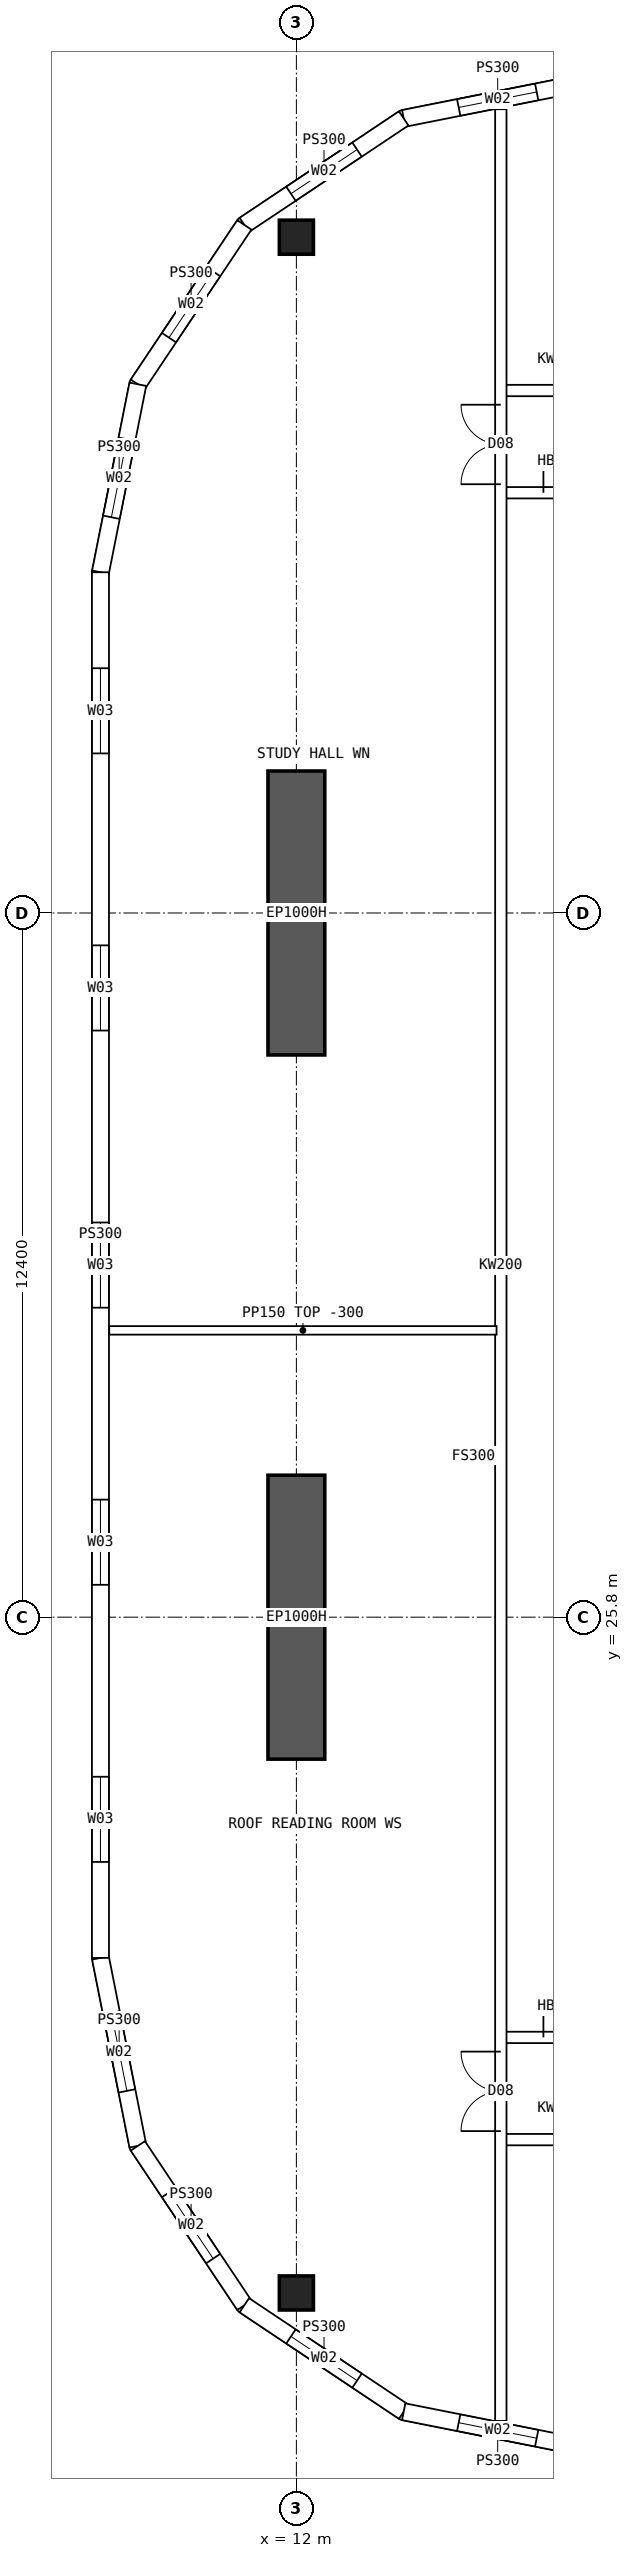
"""IFC4 building model, lengths in metres.
Left out: names, types, materials, properties, quantities, classifications, styles, units other than length and angle.
Written with IfcOpenShell. Run it as: python <this file> out.ifc"""

import sys

from ifc_helpers import new_model, si_unit, direction, frame, frame_2d, origin, origin_2d, place, context, subcontext, project, spatial, polyline, rectangle, hollow_rectangle, outline, extrude, element, fill, save


model = new_model("IFC4")
c1 = context("Model", 3, precision=1e-05, world=origin(), true_north=direction((0.0, 1.0)))
c2 = subcontext(c1, "Body", "Model", "MODEL_VIEW")
j1 = project(units=[si_unit("LENGTHUNIT", "METRE"), si_unit("PLANEANGLEUNIT", "RADIAN")], contexts=[c1])
p1 = place(None, origin())
s1 = spatial("IfcSite", under=j1, at=p1, CompositionType="ELEMENT")
p2 = place(p1, origin())
s2 = spatial("IfcBuilding", under=s1, at=p2, CompositionType="ELEMENT")
p3 = place(p2, frame((0.0, 0.0, 257.8)))
s3 = spatial("IfcBuildingStorey", under=s2, at=p3, CompositionType="ELEMENT", Elevation=257.8)
for number, where, z_axis, x_axis in (
    (1, (12.0, 13.9, 0.0), (0.0, 0.0, 1.0), (1.0, 0.0, 0.0)),
    (2, (12.0, 50.1, 0.0), (0.0, 0.0, 1.0), (1.0, 0.0, 0.0)),
):
    element("IfcColumn", number, at=place(p3, frame(where, z_axis=z_axis, x_axis=x_axis)), inside=s3, PredefinedType="COLUMN", context=c2, shape_type="SweptSolid", body=[
        extrude(hollow_rectangle(XDim=0.6, YDim=0.6, WallThickness=0.06, at=origin_2d()), origin(), (0.0, 0.0, 1.0), 4.5),
    ])
for number, where, z_axis, x_axis in (
    (3, (12.0, 23.3, 0.0), (0.0, 0.0, 1.0), (0.0, 1.0, 0.0)),
    (4, (12.0, 35.7, 0.0), (0.0, 0.0, 1.0), (0.0, 1.0, 0.0)),
):
    element("IfcWall", number, at=place(p3, frame(where, z_axis=z_axis, x_axis=x_axis)), inside=s3, PredefinedType="SHEAR", context=c2, shape_type="SweptSolid", body=[
        extrude(rectangle(XDim=5.0, YDim=1.0, at=frame_2d((2.5, 0.0))), origin(), (0.0, 0.0, 1.0), 4.5),
    ])
p4 = place(p3, frame((8.55, 44.2, 0.0), z_axis=(0.0, 0.0, 1.0), x_axis=(0.0, -1.0, 0.0)))
e5 = element("IfcWall", 5, at=p4, inside=s3, PredefinedType="SOLIDWALL", context=c2, shape_type="SweptSolid", body=[
    extrude(outline(polyline([(-0.015, -0.15), (24.415, -0.15), (24.385, 0.15), (0.015, 0.15), (-0.015, -0.15)])), origin(), (0.0, 0.0, 1.0), 4.2),
])
p5 = place(p4, frame((1.69, 0.0, 0.5)))
e6 = element("IfcOpeningElement", 6, at=p5, cuts=e5, PredefinedType="OPENING", context=c2, shape_type="SweptSolid", body=[
    extrude(rectangle(XDim=1.5, YDim=2.4, at=frame_2d((0.75, 1.2))), frame((0.0, 0.16, 0.0), z_axis=(0.0, -1.0, 0.0), x_axis=(1.0, 0.0, 0.0)), (0.0, 0.0, 1.0), 0.32),
])
p6 = place(p4, frame((6.57, 0.0, 0.5)))
e7 = element("IfcOpeningElement", 7, at=p6, cuts=e5, PredefinedType="OPENING", context=c2, shape_type="SweptSolid", body=[
    extrude(rectangle(XDim=1.5, YDim=2.4, at=frame_2d((0.75, 1.2))), frame((0.0, 0.16, 0.0), z_axis=(0.0, -1.0, 0.0), x_axis=(1.0, 0.0, 0.0)), (0.0, 0.0, 1.0), 0.32),
])
p7 = place(p4, frame((11.45, 0.0, 0.5)))
e8 = element("IfcOpeningElement", 8, at=p7, cuts=e5, PredefinedType="OPENING", context=c2, shape_type="SweptSolid", body=[
    extrude(rectangle(XDim=1.5, YDim=2.4, at=frame_2d((0.75, 1.2))), frame((0.0, 0.16, 0.0), z_axis=(0.0, -1.0, 0.0), x_axis=(1.0, 0.0, 0.0)), (0.0, 0.0, 1.0), 0.32),
])
p8 = place(p4, frame((16.33, 0.0, 0.5)))
e9 = element("IfcOpeningElement", 9, at=p8, cuts=e5, PredefinedType="OPENING", context=c2, shape_type="SweptSolid", body=[
    extrude(rectangle(XDim=1.5, YDim=2.4, at=frame_2d((0.75, 1.2))), frame((0.0, 0.16, 0.0), z_axis=(0.0, -1.0, 0.0), x_axis=(1.0, 0.0, 0.0)), (0.0, 0.0, 1.0), 0.32),
])
p9 = place(p4, frame((21.21, 0.0, 0.5)))
e10 = element("IfcOpeningElement", 10, at=p9, cuts=e5, PredefinedType="OPENING", context=c2, shape_type="SweptSolid", body=[
    extrude(rectangle(XDim=1.5, YDim=2.4, at=frame_2d((0.75, 1.2))), frame((0.0, 0.16, 0.0), z_axis=(0.0, -1.0, 0.0), x_axis=(1.0, 0.0, 0.0)), (0.0, 0.0, 1.0), 0.32),
])
p10 = place(p3, frame((17.2, 52.85, 0.0), z_axis=(0.0, 0.0, 1.0), x_axis=(-0.98078325777, -0.195100490205, 0.0)))
e11 = element("IfcWall", 11, at=p10, inside=s3, PredefinedType="SOLIDWALL", context=c2, shape_type="SweptSolid", body=[
    extrude(outline(polyline([(-0.03, -0.15), (3.405, -0.15), (3.345, 0.15), (0.03, 0.15), (-0.03, -0.15)])), origin(), (0.0, 0.0, 1.0), 4.2),
])
p11 = place(p10, frame((0.988, 0.0, 0.9)))
e12 = element("IfcOpeningElement", 12, at=p11, cuts=e11, PredefinedType="OPENING", context=c2, shape_type="SweptSolid", body=[
    extrude(rectangle(XDim=1.4, YDim=1.8, at=frame_2d((0.7, 0.9))), frame((0.0, 0.16, 0.0), z_axis=(0.0, -1.0, 0.0), x_axis=(1.0, 0.0, 0.0)), (0.0, 0.0, 1.0), 0.32),
])
p12 = place(p3, frame((13.89, 52.192, 0.0), z_axis=(0.0, 0.0, 1.0), x_axis=(-0.831460037396, -0.555584562613, 0.0)))
e13 = element("IfcWall", 13, at=p12, inside=s3, PredefinedType="SOLIDWALL", context=c2, shape_type="SweptSolid", body=[
    extrude(outline(polyline([(-0.03, -0.15), (3.405, -0.15), (3.345, 0.15), (0.03, 0.15), (-0.03, -0.15)])), origin(), (0.0, 0.0, 1.0), 4.2),
])
p13 = place(p12, frame((0.988, 0.0, 0.9)))
e14 = element("IfcOpeningElement", 14, at=p13, cuts=e13, PredefinedType="OPENING", context=c2, shape_type="SweptSolid", body=[
    extrude(rectangle(XDim=1.4, YDim=1.8, at=frame_2d((0.7, 0.9))), frame((0.0, 0.16, 0.0), z_axis=(0.0, -1.0, 0.0), x_axis=(1.0, 0.0, 0.0)), (0.0, 0.0, 1.0), 0.32),
])
p14 = place(p3, frame((11.083, 50.316, 0.0), z_axis=(0.0, 0.0, 1.0), x_axis=(-0.555567969291, -0.831471124873, 0.0)))
e15 = element("IfcWall", 15, at=p14, inside=s3, PredefinedType="SOLIDWALL", context=c2, shape_type="SweptSolid", body=[
    extrude(outline(polyline([(-0.03, -0.15), (3.405, -0.15), (3.345, 0.15), (0.03, 0.15), (-0.03, -0.15)])), origin(), (0.0, 0.0, 1.0), 4.2),
])
p15 = place(p14, frame((0.988, 0.0, 0.9)))
e16 = element("IfcOpeningElement", 16, at=p15, cuts=e15, PredefinedType="OPENING", context=c2, shape_type="SweptSolid", body=[
    extrude(rectangle(XDim=1.4, YDim=1.8, at=frame_2d((0.7, 0.9))), frame((0.0, 0.16, 0.0), z_axis=(0.0, -1.0, 0.0), x_axis=(1.0, 0.0, 0.0)), (0.0, 0.0, 1.0), 0.32),
])
p16 = place(p3, frame((9.208, 47.51, 0.0), z_axis=(0.0, 0.0, 1.0), x_axis=(-0.19508664885, -0.980786011034, 0.0)))
e17 = element("IfcWall", 17, at=p16, inside=s3, PredefinedType="SOLIDWALL", context=c2, shape_type="SweptSolid", body=[
    extrude(outline(polyline([(-0.03, -0.15), (3.39, -0.15), (3.36, 0.15), (0.03, 0.15), (-0.03, -0.15)])), origin(), (0.0, 0.0, 1.0), 4.2),
])
p17 = place(p16, frame((0.988, 0.0, 0.9)))
e18 = element("IfcOpeningElement", 18, at=p17, cuts=e17, PredefinedType="OPENING", context=c2, shape_type="SweptSolid", body=[
    extrude(rectangle(XDim=1.4, YDim=1.8, at=frame_2d((0.7, 0.9))), frame((0.0, 0.16, 0.0), z_axis=(0.0, -1.0, 0.0), x_axis=(1.0, 0.0, 0.0)), (0.0, 0.0, 1.0), 0.32),
])
p18 = place(p3, frame((8.55, 19.8, 0.0), z_axis=(0.0, 0.0, 1.0), x_axis=(0.19508664885, -0.980786011034, 0.0)))
e19 = element("IfcWall", 19, at=p18, inside=s3, PredefinedType="SOLIDWALL", context=c2, shape_type="SweptSolid", body=[
    extrude(outline(polyline([(-0.015, -0.15), (3.405, -0.15), (3.345, 0.15), (0.015, 0.15), (-0.015, -0.15)])), origin(), (0.0, 0.0, 1.0), 4.2),
])
p19 = place(p18, frame((0.988, 0.0, 0.9)))
e20 = element("IfcOpeningElement", 20, at=p19, cuts=e19, PredefinedType="OPENING", context=c2, shape_type="SweptSolid", body=[
    extrude(rectangle(XDim=1.4, YDim=1.8, at=frame_2d((0.7, 0.9))), frame((0.0, 0.16, 0.0), z_axis=(0.0, -1.0, 0.0), x_axis=(1.0, 0.0, 0.0)), (0.0, 0.0, 1.0), 0.32),
])
p20 = place(p3, frame((9.208, 16.49, 0.0), z_axis=(0.0, 0.0, 1.0), x_axis=(0.555567969291, -0.831471124873, 0.0)))
e21 = element("IfcWall", 21, at=p20, inside=s3, PredefinedType="SOLIDWALL", context=c2, shape_type="SweptSolid", body=[
    extrude(outline(polyline([(-0.03, -0.15), (3.405, -0.15), (3.345, 0.15), (0.03, 0.15), (-0.03, -0.15)])), origin(), (0.0, 0.0, 1.0), 4.2),
])
p21 = place(p20, frame((0.988, 0.0, 0.9)))
e22 = element("IfcOpeningElement", 22, at=p21, cuts=e21, PredefinedType="OPENING", context=c2, shape_type="SweptSolid", body=[
    extrude(rectangle(XDim=1.4, YDim=1.8, at=frame_2d((0.7, 0.9))), frame((0.0, 0.16, 0.0), z_axis=(0.0, -1.0, 0.0), x_axis=(1.0, 0.0, 0.0)), (0.0, 0.0, 1.0), 0.32),
])
p22 = place(p3, frame((11.083, 13.684, 0.0), z_axis=(0.0, 0.0, 1.0), x_axis=(0.831460037396, -0.555584562613, 0.0)))
e23 = element("IfcWall", 23, at=p22, inside=s3, PredefinedType="SOLIDWALL", context=c2, shape_type="SweptSolid", body=[
    extrude(outline(polyline([(-0.03, -0.15), (3.405, -0.15), (3.345, 0.15), (0.03, 0.15), (-0.03, -0.15)])), origin(), (0.0, 0.0, 1.0), 4.2),
])
p23 = place(p22, frame((0.988, 0.0, 0.9)))
e24 = element("IfcOpeningElement", 24, at=p23, cuts=e23, PredefinedType="OPENING", context=c2, shape_type="SweptSolid", body=[
    extrude(rectangle(XDim=1.4, YDim=1.8, at=frame_2d((0.7, 0.9))), frame((0.0, 0.16, 0.0), z_axis=(0.0, -1.0, 0.0), x_axis=(1.0, 0.0, 0.0)), (0.0, 0.0, 1.0), 0.32),
])
p24 = place(p3, frame((13.89, 11.808, 0.0), z_axis=(0.0, 0.0, 1.0), x_axis=(0.98078325777, -0.195100490205, 0.0)))
e25 = element("IfcWall", 25, at=p24, inside=s3, PredefinedType="SOLIDWALL", context=c2, shape_type="SweptSolid", body=[
    extrude(outline(polyline([(-0.03, -0.15), (3.405, -0.15), (3.345, 0.15), (0.03, 0.15), (-0.03, -0.15)])), origin(), (0.0, 0.0, 1.0), 4.2),
])
p25 = place(p24, frame((0.988, 0.0, 0.9)))
e26 = element("IfcOpeningElement", 26, at=p25, cuts=e25, PredefinedType="OPENING", context=c2, shape_type="SweptSolid", body=[
    extrude(rectangle(XDim=1.4, YDim=1.8, at=frame_2d((0.7, 0.9))), frame((0.0, 0.16, 0.0), z_axis=(0.0, -1.0, 0.0), x_axis=(1.0, 0.0, 0.0)), (0.0, 0.0, 1.0), 0.32),
])
p26 = place(p3, frame((15.6, 16.6, 0.0), z_axis=(0.0, 0.0, 1.0), x_axis=(1.0, 0.0, 0.0)))
e27 = element("IfcWall", 27, at=p26, inside=s3, PredefinedType="SOLIDWALL", context=c2, shape_type="SweptSolid", body=[
    extrude(rectangle(XDim=2.05, YDim=0.2, at=frame_2d((1.025, 0.0))), origin(), (0.0, 0.0, 1.0), 4.2),
])
p27 = place(p26, frame((0.95, 0.0, 0.0)))
e28 = element("IfcOpeningElement", 28, at=p27, cuts=e27, PredefinedType="OPENING", context=c2, shape_type="SweptSolid", body=[
    extrude(rectangle(XDim=0.9, YDim=2.1, at=frame_2d((0.45, 1.05))), frame((0.0, 0.11, 0.0), z_axis=(0.0, -1.0, 0.0), x_axis=(1.0, 0.0, 0.0)), (0.0, 0.0, 1.0), 0.22),
])
p28 = place(p3, frame((15.6, 18.4, 0.0), z_axis=(0.0, 0.0, 1.0), x_axis=(1.0, 0.0, 0.0)))
e29 = element("IfcWall", 29, at=p28, inside=s3, PredefinedType="SOLIDWALL", context=c2, shape_type="SweptSolid", body=[
    extrude(rectangle(XDim=2.05, YDim=0.2, at=frame_2d((1.025, 0.0))), origin(), (0.0, 0.0, 1.0), 4.2),
])
p29 = place(p28, frame((0.75, 0.0, 0.0)))
e30 = element("IfcOpeningElement", 30, at=p29, cuts=e29, PredefinedType="OPENING", context=c2, shape_type="SweptSolid", body=[
    extrude(rectangle(XDim=1.2, YDim=2.1, at=frame_2d((0.6, 1.05))), frame((0.0, 0.11, 0.0), z_axis=(0.0, -1.0, 0.0), x_axis=(1.0, 0.0, 0.0)), (0.0, 0.0, 1.0), 0.22),
])
p30 = place(p3, frame((15.6, 47.4, 0.0), z_axis=(0.0, 0.0, 1.0), x_axis=(1.0, 0.0, 0.0)))
e31 = element("IfcWall", 31, at=p30, inside=s3, PredefinedType="SOLIDWALL", context=c2, shape_type="SweptSolid", body=[
    extrude(rectangle(XDim=2.05, YDim=0.2, at=frame_2d((1.025, 0.0))), origin(), (0.0, 0.0, 1.0), 4.2),
])
p31 = place(p30, frame((0.95, 0.0, 0.0)))
e32 = element("IfcOpeningElement", 32, at=p31, cuts=e31, PredefinedType="OPENING", context=c2, shape_type="SweptSolid", body=[
    extrude(rectangle(XDim=0.9, YDim=2.1, at=frame_2d((0.45, 1.05))), frame((0.0, 0.11, 0.0), z_axis=(0.0, -1.0, 0.0), x_axis=(1.0, 0.0, 0.0)), (0.0, 0.0, 1.0), 0.22),
])
p32 = place(p3, frame((15.6, 45.6, 0.0), z_axis=(0.0, 0.0, 1.0), x_axis=(1.0, 0.0, 0.0)))
e33 = element("IfcWall", 33, at=p32, inside=s3, PredefinedType="SOLIDWALL", context=c2, shape_type="SweptSolid", body=[
    extrude(rectangle(XDim=2.05, YDim=0.2, at=frame_2d((1.025, 0.0))), origin(), (0.0, 0.0, 1.0), 4.2),
])
p33 = place(p32, frame((0.75, 0.0, 0.0)))
e34 = element("IfcOpeningElement", 34, at=p33, cuts=e33, PredefinedType="OPENING", context=c2, shape_type="SweptSolid", body=[
    extrude(rectangle(XDim=1.2, YDim=2.1, at=frame_2d((0.6, 1.05))), frame((0.0, 0.11, 0.0), z_axis=(0.0, -1.0, 0.0), x_axis=(1.0, 0.0, 0.0)), (0.0, 0.0, 1.0), 0.22),
])
p34 = place(p3, frame((8.705, 30.85, 0.0), z_axis=(0.0, 0.0, 1.0), x_axis=(1.0, 0.0, 0.0)))
e35 = element("IfcWall", 35, at=p34, inside=s3, PredefinedType="PARTITIONING", context=c2, shape_type="SweptSolid", body=[
    extrude(outline(polyline([(0.0, 0.0), (6.82, 0.0), (6.82, 4.2), (3.597, 4.2), (3.595, 3.75), (2.997, 3.75), (2.995, 4.2), (0.0, 4.2), (0.0, 0.0)])), frame((0.0, 0.075, 0.0), z_axis=(0.0, -1.0, 0.0), x_axis=(1.0, 0.0, 0.0)), (0.0, 0.0, 1.0), 0.15),
])
p35 = place(p3, frame((15.6, 11.646, 0.0), z_axis=(0.0, 0.0, 1.0), x_axis=(0.0, 1.0, 0.0)))
e36 = element("IfcWall", 36, at=p35, inside=s3, PredefinedType="SOLIDWALL", context=c2, shape_type="SweptSolid", body=[
    extrude(rectangle(XDim=40.708, YDim=0.2, at=frame_2d((20.354, 0.0))), origin(), (0.0, 0.0, 1.0), 4.2),
])
p36 = place(p35, frame((5.104, 0.0, 0.0)))
e37 = element("IfcOpeningElement", 37, at=p36, cuts=e36, PredefinedType="OPENING", context=c2, shape_type="SweptSolid", body=[
    extrude(rectangle(XDim=1.4, YDim=2.1, at=frame_2d((0.7, 1.05))), frame((0.0, 0.11, 0.0), z_axis=(0.0, -1.0, 0.0), x_axis=(1.0, 0.0, 0.0)), (0.0, 0.0, 1.0), 0.22),
])
p37 = place(p35, frame((34.104, 0.0, 0.0)))
e38 = element("IfcOpeningElement", 38, at=p37, cuts=e36, PredefinedType="OPENING", context=c2, shape_type="SweptSolid", body=[
    extrude(rectangle(XDim=1.4, YDim=2.1, at=frame_2d((0.7, 1.05))), frame((0.0, 0.11, 0.0), z_axis=(0.0, -1.0, 0.0), x_axis=(1.0, 0.0, 0.0)), (0.0, 0.0, 1.0), 0.22),
])
p38 = place(p5, origin())
e39 = element("IfcWindow", 39, at=p38, inside=s3, PartitioningType="SINGLE_PANEL", PredefinedType="WINDOW", context=c2, shape_type="SweptSolid", body=[
    extrude(rectangle(XDim=1.5, YDim=2.4, at=frame_2d((0.75, 1.2))), frame((0.0, 0.03, 0.0), z_axis=(0.0, -1.0, 0.0), x_axis=(1.0, 0.0, 0.0)), (0.0, 0.0, 1.0), 0.06),
])
fill(e6, e39)
p39 = place(p6, origin())
e40 = element("IfcWindow", 40, at=p39, inside=s3, PartitioningType="SINGLE_PANEL", PredefinedType="WINDOW", context=c2, shape_type="SweptSolid", body=[
    extrude(rectangle(XDim=1.5, YDim=2.4, at=frame_2d((0.75, 1.2))), frame((0.0, 0.03, 0.0), z_axis=(0.0, -1.0, 0.0), x_axis=(1.0, 0.0, 0.0)), (0.0, 0.0, 1.0), 0.06),
])
fill(e7, e40)
p40 = place(p7, origin())
e41 = element("IfcWindow", 41, at=p40, inside=s3, PartitioningType="SINGLE_PANEL", PredefinedType="WINDOW", context=c2, shape_type="SweptSolid", body=[
    extrude(rectangle(XDim=1.5, YDim=2.4, at=frame_2d((0.75, 1.2))), frame((0.0, 0.03, 0.0), z_axis=(0.0, -1.0, 0.0), x_axis=(1.0, 0.0, 0.0)), (0.0, 0.0, 1.0), 0.06),
])
fill(e8, e41)
p41 = place(p8, origin())
e42 = element("IfcWindow", 42, at=p41, inside=s3, PartitioningType="SINGLE_PANEL", PredefinedType="WINDOW", context=c2, shape_type="SweptSolid", body=[
    extrude(rectangle(XDim=1.5, YDim=2.4, at=frame_2d((0.75, 1.2))), frame((0.0, 0.03, 0.0), z_axis=(0.0, -1.0, 0.0), x_axis=(1.0, 0.0, 0.0)), (0.0, 0.0, 1.0), 0.06),
])
fill(e9, e42)
p42 = place(p9, origin())
e43 = element("IfcWindow", 43, at=p42, inside=s3, PartitioningType="SINGLE_PANEL", PredefinedType="WINDOW", context=c2, shape_type="SweptSolid", body=[
    extrude(rectangle(XDim=1.5, YDim=2.4, at=frame_2d((0.75, 1.2))), frame((0.0, 0.03, 0.0), z_axis=(0.0, -1.0, 0.0), x_axis=(1.0, 0.0, 0.0)), (0.0, 0.0, 1.0), 0.06),
])
fill(e10, e43)
p43 = place(p11, origin())
e44 = element("IfcWindow", 44, at=p43, inside=s3, PartitioningType="SINGLE_PANEL", PredefinedType="WINDOW", context=c2, shape_type="SweptSolid", body=[
    extrude(rectangle(XDim=1.4, YDim=1.8, at=frame_2d((0.7, 0.9))), frame((0.0, 0.03, 0.0), z_axis=(0.0, -1.0, 0.0), x_axis=(1.0, 0.0, 0.0)), (0.0, 0.0, 1.0), 0.06),
])
fill(e12, e44)
p44 = place(p13, origin())
e45 = element("IfcWindow", 45, at=p44, inside=s3, PartitioningType="SINGLE_PANEL", PredefinedType="WINDOW", context=c2, shape_type="SweptSolid", body=[
    extrude(rectangle(XDim=1.4, YDim=1.8, at=frame_2d((0.7, 0.9))), frame((0.0, 0.03, 0.0), z_axis=(0.0, -1.0, 0.0), x_axis=(1.0, 0.0, 0.0)), (0.0, 0.0, 1.0), 0.06),
])
fill(e14, e45)
p45 = place(p15, origin())
e46 = element("IfcWindow", 46, at=p45, inside=s3, PartitioningType="SINGLE_PANEL", PredefinedType="WINDOW", context=c2, shape_type="SweptSolid", body=[
    extrude(rectangle(XDim=1.4, YDim=1.8, at=frame_2d((0.7, 0.9))), frame((0.0, 0.03, 0.0), z_axis=(0.0, -1.0, 0.0), x_axis=(1.0, 0.0, 0.0)), (0.0, 0.0, 1.0), 0.06),
])
fill(e16, e46)
p46 = place(p17, origin())
e47 = element("IfcWindow", 47, at=p46, inside=s3, PartitioningType="SINGLE_PANEL", PredefinedType="WINDOW", context=c2, shape_type="SweptSolid", body=[
    extrude(rectangle(XDim=1.4, YDim=1.8, at=frame_2d((0.7, 0.9))), frame((0.0, 0.03, 0.0), z_axis=(0.0, -1.0, 0.0), x_axis=(1.0, 0.0, 0.0)), (0.0, 0.0, 1.0), 0.06),
])
fill(e18, e47)
p47 = place(p19, origin())
e48 = element("IfcWindow", 48, at=p47, inside=s3, PartitioningType="SINGLE_PANEL", PredefinedType="WINDOW", context=c2, shape_type="SweptSolid", body=[
    extrude(rectangle(XDim=1.4, YDim=1.8, at=frame_2d((0.7, 0.9))), frame((0.0, 0.03, 0.0), z_axis=(0.0, -1.0, 0.0), x_axis=(1.0, 0.0, 0.0)), (0.0, 0.0, 1.0), 0.06),
])
fill(e20, e48)
p48 = place(p21, origin())
e49 = element("IfcWindow", 49, at=p48, inside=s3, PartitioningType="SINGLE_PANEL", PredefinedType="WINDOW", context=c2, shape_type="SweptSolid", body=[
    extrude(rectangle(XDim=1.4, YDim=1.8, at=frame_2d((0.7, 0.9))), frame((0.0, 0.03, 0.0), z_axis=(0.0, -1.0, 0.0), x_axis=(1.0, 0.0, 0.0)), (0.0, 0.0, 1.0), 0.06),
])
fill(e22, e49)
p49 = place(p23, origin())
e50 = element("IfcWindow", 50, at=p49, inside=s3, PartitioningType="SINGLE_PANEL", PredefinedType="WINDOW", context=c2, shape_type="SweptSolid", body=[
    extrude(rectangle(XDim=1.4, YDim=1.8, at=frame_2d((0.7, 0.9))), frame((0.0, 0.03, 0.0), z_axis=(0.0, -1.0, 0.0), x_axis=(1.0, 0.0, 0.0)), (0.0, 0.0, 1.0), 0.06),
])
fill(e24, e50)
p50 = place(p25, origin())
e51 = element("IfcWindow", 51, at=p50, inside=s3, PartitioningType="SINGLE_PANEL", PredefinedType="WINDOW", context=c2, shape_type="SweptSolid", body=[
    extrude(rectangle(XDim=1.4, YDim=1.8, at=frame_2d((0.7, 0.9))), frame((0.0, 0.03, 0.0), z_axis=(0.0, -1.0, 0.0), x_axis=(1.0, 0.0, 0.0)), (0.0, 0.0, 1.0), 0.06),
])
fill(e26, e51)
p51 = place(p29, origin())
e52 = element("IfcDoor", 52, at=p51, inside=s3, OperationType="DOUBLE_DOOR_SINGLE_SWING", PredefinedType="DOOR", context=c2, shape_type="SweptSolid", body=[
    extrude(rectangle(XDim=1.2, YDim=2.1, at=frame_2d((0.6, 1.05))), frame((0.0, 0.025, 0.0), z_axis=(0.0, -1.0, 0.0), x_axis=(1.0, 0.0, 0.0)), (0.0, 0.0, 1.0), 0.05),
])
fill(e30, e52)
p52 = place(p33, origin())
e53 = element("IfcDoor", 53, at=p52, inside=s3, OperationType="DOUBLE_DOOR_SINGLE_SWING", PredefinedType="DOOR", context=c2, shape_type="SweptSolid", body=[
    extrude(rectangle(XDim=1.2, YDim=2.1, at=frame_2d((0.6, 1.05))), frame((0.0, 0.025, 0.0), z_axis=(0.0, -1.0, 0.0), x_axis=(1.0, 0.0, 0.0)), (0.0, 0.0, 1.0), 0.05),
])
fill(e34, e53)
p53 = place(p36, origin())
e54 = element("IfcDoor", 54, at=p53, inside=s3, OperationType="DOUBLE_DOOR_SINGLE_SWING", PredefinedType="DOOR", context=c2, shape_type="SweptSolid", body=[
    extrude(rectangle(XDim=1.4, YDim=2.1, at=frame_2d((0.7, 1.05))), frame((0.0, 0.025, 0.0), z_axis=(0.0, -1.0, 0.0), x_axis=(1.0, 0.0, 0.0)), (0.0, 0.0, 1.0), 0.05),
])
fill(e37, e54)
p54 = place(p37, origin())
e55 = element("IfcDoor", 55, at=p54, inside=s3, OperationType="DOUBLE_DOOR_SINGLE_SWING", PredefinedType="DOOR", context=c2, shape_type="SweptSolid", body=[
    extrude(rectangle(XDim=1.4, YDim=2.1, at=frame_2d((0.7, 1.05))), frame((0.0, 0.025, 0.0), z_axis=(0.0, -1.0, 0.0), x_axis=(1.0, 0.0, 0.0)), (0.0, 0.0, 1.0), 0.05),
])
fill(e38, e55)
save(model, sys.argv[1])
